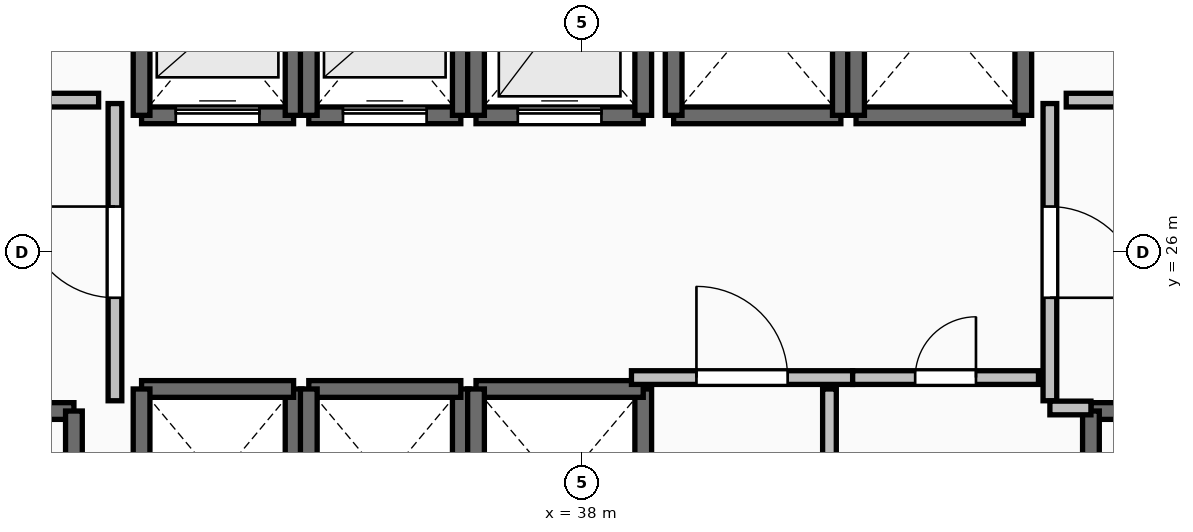
"""IFC4 building model, lengths in metres.
Left out: names, types, materials, properties, quantities, classifications, styles, units other than length and angle.
Written with IfcOpenShell. Run it as: python <this file> out.ifc"""

import sys

from ifc_helpers import new_model, si_unit, direction, frame, frame_2d, origin, place, context, subcontext, project, spatial, rectangle, extrude, element, fill, save


model = new_model("IFC4")
c1 = context("Model", 3, precision=1e-05, world=origin(), true_north=direction((0.0, 1.0)))
c2 = subcontext(c1, "Body", "Model", "MODEL_VIEW")
j1 = project(units=[si_unit("LENGTHUNIT", "METRE"), si_unit("PLANEANGLEUNIT", "RADIAN")], contexts=[c1])
p1 = place(None, origin())
s1 = spatial("IfcSite", under=j1, at=p1, CompositionType="ELEMENT")
p2 = place(p1, origin())
s2 = spatial("IfcBuilding", under=s1, at=p2, CompositionType="ELEMENT")
p3 = place(p2, frame((0.0, 0.0, 117.3)))
s3 = spatial("IfcBuildingStorey", under=s2, at=p3, CompositionType="ELEMENT", Elevation=117.3)
p4 = place(p3, frame((27.94, 23.91, 0.0), z_axis=(0.0, 0.0, 1.0), x_axis=(1.0, 0.0, 0.0)))
e1 = element("IfcWall", 1, at=p4, inside=s3, PredefinedType="SOLIDWALL", context=c2, shape_type="SweptSolid", body=[
    extrude(rectangle(XDim=3.37, YDim=0.22, at=frame_2d((1.685, 0.0))), origin(), (0.0, 0.0, 1.0), 3.24),
])
p5 = place(p4, frame((1.135, 0.0, 0.0)))
e2 = element("IfcOpeningElement", 2, at=p5, cuts=e1, PredefinedType="OPENING", context=c2, shape_type="SweptSolid", body=[
    extrude(rectangle(XDim=1.1, YDim=2.15, at=frame_2d((0.55, 1.075))), frame((0.0, 0.125, 0.0), z_axis=(0.0, -1.0, 0.0), x_axis=(1.0, 0.0, 0.0)), (0.0, 0.0, 1.0), 0.25),
])
p6 = place(p3, frame((31.31, 23.91, 0.0), z_axis=(0.0, 0.0, 1.0), x_axis=(0.0, -1.0, 0.0)))
e3 = element("IfcWall", 3, at=p6, inside=s3, PredefinedType="SOLIDWALL", context=c2, shape_type="SweptSolid", body=[
    extrude(rectangle(XDim=7.42, YDim=0.22, at=frame_2d((3.71, 0.0))), origin(), (0.0, 0.0, 1.0), 3.24),
])
p7 = place(p3, frame((44.69, 23.91, 0.0), z_axis=(0.0, 0.0, 1.0), x_axis=(1.0, 0.0, 0.0)))
e4 = element("IfcWall", 4, at=p7, inside=s3, PredefinedType="SOLIDWALL", context=c2, shape_type="SweptSolid", body=[
    extrude(rectangle(XDim=3.37, YDim=0.22, at=frame_2d((1.685, 0.0))), origin(), (0.0, 0.0, 1.0), 3.24),
])
p8 = place(p7, frame((1.135, 0.0, 0.0)))
e5 = element("IfcOpeningElement", 5, at=p8, cuts=e4, PredefinedType="OPENING", context=c2, shape_type="SweptSolid", body=[
    extrude(rectangle(XDim=1.1, YDim=2.15, at=frame_2d((0.55, 1.075))), frame((0.0, 0.125, 0.0), z_axis=(0.0, -1.0, 0.0), x_axis=(1.0, 0.0, 0.0)), (0.0, 0.0, 1.0), 0.25),
])
p9 = place(p3, frame((44.69, 16.49, 0.0), z_axis=(0.0, 0.0, 1.0), x_axis=(0.0, 1.0, 0.0)))
e6 = element("IfcWall", 6, at=p9, inside=s3, PredefinedType="SOLIDWALL", context=c2, shape_type="SweptSolid", body=[
    extrude(rectangle(XDim=7.42, YDim=0.22, at=frame_2d((3.71, 0.0))), origin(), (0.0, 0.0, 1.0), 3.24),
])
p10 = place(p3, frame((32.2, 27.8, 0.0), z_axis=(0.0, 0.0, 1.0), x_axis=(1.0, 0.0, 0.0)))
e7 = element("IfcWall", 7, at=p10, inside=s3, PredefinedType="SOLIDWALL", context=c2, shape_type="SweptSolid", body=[
    extrude(rectangle(XDim=2.0, YDim=0.22, at=frame_2d((1.0, 0.0))), origin(), (0.0, 0.0, 1.0), 3.24),
])
p11 = place(p10, frame((0.45, 0.0, 0.0)))
e8 = element("IfcOpeningElement", 8, at=p11, cuts=e7, PredefinedType="OPENING", context=c2, shape_type="SweptSolid", body=[
    extrude(rectangle(XDim=1.1, YDim=2.2, at=frame_2d((0.55, 1.1))), frame((0.0, 0.125, 0.0), z_axis=(0.0, -1.0, 0.0), x_axis=(1.0, 0.0, 0.0)), (0.0, 0.0, 1.0), 0.25),
])
for number, where, z_axis, x_axis in (
    (9, (34.2, 27.8, 0.0), (0.0, 0.0, 1.0), (0.0, 1.0, 0.0)),
    (10, (32.2, 30.2, 0.0), (0.0, 0.0, 1.0), (0.0, -1.0, 0.0)),
):
    element("IfcWall", number, at=place(p3, frame(where, z_axis=z_axis, x_axis=x_axis)), inside=s3, PredefinedType="SOLIDWALL", context=c2, shape_type="SweptSolid", body=[
        extrude(rectangle(XDim=2.4, YDim=0.22, at=frame_2d((1.2, 0.0))), origin(), (0.0, 0.0, 1.0), 3.24),
    ])
p12 = place(p3, frame((34.4, 27.8, 0.0), z_axis=(0.0, 0.0, 1.0), x_axis=(1.0, 0.0, 0.0)))
e11 = element("IfcWall", 11, at=p12, inside=s3, PredefinedType="SOLIDWALL", context=c2, shape_type="SweptSolid", body=[
    extrude(rectangle(XDim=2.0, YDim=0.22, at=frame_2d((1.0, 0.0))), origin(), (0.0, 0.0, 1.0), 3.24),
])
p13 = place(p12, frame((0.45, 0.0, 0.0)))
e12 = element("IfcOpeningElement", 12, at=p13, cuts=e11, PredefinedType="OPENING", context=c2, shape_type="SweptSolid", body=[
    extrude(rectangle(XDim=1.1, YDim=2.2, at=frame_2d((0.55, 1.1))), frame((0.0, 0.125, 0.0), z_axis=(0.0, -1.0, 0.0), x_axis=(1.0, 0.0, 0.0)), (0.0, 0.0, 1.0), 0.25),
])
for number, where, z_axis, x_axis in (
    (13, (36.4, 27.8, 0.0), (0.0, 0.0, 1.0), (0.0, 1.0, 0.0)),
    (14, (34.4, 30.2, 0.0), (0.0, 0.0, 1.0), (0.0, -1.0, 0.0)),
):
    element("IfcWall", number, at=place(p3, frame(where, z_axis=z_axis, x_axis=x_axis)), inside=s3, PredefinedType="SOLIDWALL", context=c2, shape_type="SweptSolid", body=[
        extrude(rectangle(XDim=2.4, YDim=0.22, at=frame_2d((1.2, 0.0))), origin(), (0.0, 0.0, 1.0), 3.24),
    ])
p14 = place(p3, frame((36.6, 27.8, 0.0), z_axis=(0.0, 0.0, 1.0), x_axis=(1.0, 0.0, 0.0)))
e15 = element("IfcWall", 15, at=p14, inside=s3, PredefinedType="SOLIDWALL", context=c2, shape_type="SweptSolid", body=[
    extrude(rectangle(XDim=2.2, YDim=0.22, at=frame_2d((1.1, 0.0))), origin(), (0.0, 0.0, 1.0), 3.24),
])
p15 = place(p14, frame((0.55, 0.0, 0.0)))
e16 = element("IfcOpeningElement", 16, at=p15, cuts=e15, PredefinedType="OPENING", context=c2, shape_type="SweptSolid", body=[
    extrude(rectangle(XDim=1.1, YDim=2.2, at=frame_2d((0.55, 1.1))), frame((0.0, 0.125, 0.0), z_axis=(0.0, -1.0, 0.0), x_axis=(1.0, 0.0, 0.0)), (0.0, 0.0, 1.0), 0.25),
])
for number, where, z_axis, x_axis in (
    (17, (38.8, 27.8, 0.0), (0.0, 0.0, 1.0), (0.0, 1.0, 0.0)),
    (18, (36.6, 30.4, 0.0), (0.0, 0.0, 1.0), (0.0, -1.0, 0.0)),
):
    element("IfcWall", number, at=place(p3, frame(where, z_axis=z_axis, x_axis=x_axis)), inside=s3, PredefinedType="SOLIDWALL", context=c2, shape_type="SweptSolid", body=[
        extrude(rectangle(XDim=2.6, YDim=0.22, at=frame_2d((1.3, 0.0))), origin(), (0.0, 0.0, 1.0), 3.24),
    ])
p16 = place(p3, frame((34.2, 21.8, 0.0), z_axis=(0.0, 0.0, 1.0), x_axis=(0.0, 1.0, 0.0)))
e19 = element("IfcWall", 19, at=p16, inside=s3, PredefinedType="SOLIDWALL", context=c2, shape_type="SweptSolid", body=[
    extrude(rectangle(XDim=2.4, YDim=0.22, at=frame_2d((1.2, 0.0))), origin(), (0.0, 0.0, 1.0), 3.24),
])
p17 = place(p3, frame((34.2, 24.2, 0.0), z_axis=(0.0, 0.0, 1.0), x_axis=(-1.0, 0.0, 0.0)))
e20 = element("IfcWall", 20, at=p17, inside=s3, PredefinedType="SOLIDWALL", context=c2, shape_type="SweptSolid", body=[
    extrude(rectangle(XDim=2.0, YDim=0.22, at=frame_2d((1.0, 0.0))), origin(), (0.0, 0.0, 1.0), 3.24),
])
for number, where, z_axis, x_axis in (
    (21, (32.2, 24.2, 0.0), (0.0, 0.0, 1.0), (0.0, -1.0, 0.0)),
    (22, (36.4, 21.8, 0.0), (0.0, 0.0, 1.0), (0.0, 1.0, 0.0)),
):
    element("IfcWall", number, at=place(p3, frame(where, z_axis=z_axis, x_axis=x_axis)), inside=s3, PredefinedType="SOLIDWALL", context=c2, shape_type="SweptSolid", body=[
        extrude(rectangle(XDim=2.4, YDim=0.22, at=frame_2d((1.2, 0.0))), origin(), (0.0, 0.0, 1.0), 3.24),
    ])
p18 = place(p3, frame((36.4, 24.2, 0.0), z_axis=(0.0, 0.0, 1.0), x_axis=(-1.0, 0.0, 0.0)))
e23 = element("IfcWall", 23, at=p18, inside=s3, PredefinedType="SOLIDWALL", context=c2, shape_type="SweptSolid", body=[
    extrude(rectangle(XDim=2.0, YDim=0.22, at=frame_2d((1.0, 0.0))), origin(), (0.0, 0.0, 1.0), 3.24),
])
p19 = place(p3, frame((34.4, 24.2, 0.0), z_axis=(0.0, 0.0, 1.0), x_axis=(0.0, -1.0, 0.0)))
e24 = element("IfcWall", 24, at=p19, inside=s3, PredefinedType="SOLIDWALL", context=c2, shape_type="SweptSolid", body=[
    extrude(rectangle(XDim=2.4, YDim=0.22, at=frame_2d((1.2, 0.0))), origin(), (0.0, 0.0, 1.0), 3.24),
])
p20 = place(p3, frame((38.8, 21.6, 0.0), z_axis=(0.0, 0.0, 1.0), x_axis=(0.0, 1.0, 0.0)))
e25 = element("IfcWall", 25, at=p20, inside=s3, PredefinedType="SOLIDWALL", context=c2, shape_type="SweptSolid", body=[
    extrude(rectangle(XDim=2.6, YDim=0.22, at=frame_2d((1.3, 0.0))), origin(), (0.0, 0.0, 1.0), 3.24),
])
p21 = place(p3, frame((38.8, 24.2, 0.0), z_axis=(0.0, 0.0, 1.0), x_axis=(-1.0, 0.0, 0.0)))
e26 = element("IfcWall", 26, at=p21, inside=s3, PredefinedType="SOLIDWALL", context=c2, shape_type="SweptSolid", body=[
    extrude(rectangle(XDim=2.2, YDim=0.22, at=frame_2d((1.1, 0.0))), origin(), (0.0, 0.0, 1.0), 3.24),
])
p22 = place(p3, frame((36.6, 24.2, 0.0), z_axis=(0.0, 0.0, 1.0), x_axis=(0.0, -1.0, 0.0)))
e27 = element("IfcWall", 27, at=p22, inside=s3, PredefinedType="SOLIDWALL", context=c2, shape_type="SweptSolid", body=[
    extrude(rectangle(XDim=2.6, YDim=0.22, at=frame_2d((1.3, 0.0))), origin(), (0.0, 0.0, 1.0), 3.24),
])
p23 = place(p3, frame((39.2, 27.8, 0.0), z_axis=(0.0, 0.0, 1.0), x_axis=(1.0, 0.0, 0.0)))
e28 = element("IfcWall", 28, at=p23, inside=s3, PredefinedType="SOLIDWALL", context=c2, shape_type="SweptSolid", body=[
    extrude(rectangle(XDim=2.2, YDim=0.22, at=frame_2d((1.1, 0.0))), origin(), (0.0, 0.0, 1.0), 3.24),
])
for number, where, z_axis, x_axis in (
    (29, (41.4, 27.8, 0.0), (0.0, 0.0, 1.0), (0.0, 1.0, 0.0)),
    (30, (39.2, 30.4, 0.0), (0.0, 0.0, 1.0), (0.0, -1.0, 0.0)),
):
    element("IfcWall", number, at=place(p3, frame(where, z_axis=z_axis, x_axis=x_axis)), inside=s3, PredefinedType="SOLIDWALL", context=c2, shape_type="SweptSolid", body=[
        extrude(rectangle(XDim=2.6, YDim=0.22, at=frame_2d((1.3, 0.0))), origin(), (0.0, 0.0, 1.0), 3.24),
    ])
p24 = place(p3, frame((41.6, 27.8, 0.0), z_axis=(0.0, 0.0, 1.0), x_axis=(1.0, 0.0, 0.0)))
e31 = element("IfcWall", 31, at=p24, inside=s3, PredefinedType="SOLIDWALL", context=c2, shape_type="SweptSolid", body=[
    extrude(rectangle(XDim=2.2, YDim=0.22, at=frame_2d((1.1, 0.0))), origin(), (0.0, 0.0, 1.0), 3.24),
])
for number, where, z_axis, x_axis in (
    (32, (43.8, 27.8, 0.0), (0.0, 0.0, 1.0), (0.0, 1.0, 0.0)),
    (33, (41.6, 30.4, 0.0), (0.0, 0.0, 1.0), (0.0, -1.0, 0.0)),
):
    element("IfcWall", number, at=place(p3, frame(where, z_axis=z_axis, x_axis=x_axis)), inside=s3, PredefinedType="SOLIDWALL", context=c2, shape_type="SweptSolid", body=[
        extrude(rectangle(XDim=2.6, YDim=0.22, at=frame_2d((1.3, 0.0))), origin(), (0.0, 0.0, 1.0), 3.24),
    ])
p25 = place(p3, frame((31.85, 24.045, 0.0), z_axis=(0.0, 0.0, 1.0), x_axis=(0.0, 1.0, 0.0)))
e34 = element("IfcWall", 34, at=p25, inside=s3, PredefinedType="PARTITIONING", context=c2, shape_type="SweptSolid", body=[
    extrude(rectangle(XDim=3.91, YDim=0.18, at=frame_2d((1.955, 0.0))), origin(), (0.0, 0.0, 1.0), 3.24),
])
p26 = place(p25, frame((1.355, 0.0, 0.0)))
e35 = element("IfcOpeningElement", 35, at=p26, cuts=e34, PredefinedType="OPENING", context=c2, shape_type="SweptSolid", body=[
    extrude(rectangle(XDim=1.2, YDim=2.15, at=frame_2d((0.6, 1.075))), frame((0.0, 0.105, 0.0), z_axis=(0.0, -1.0, 0.0), x_axis=(1.0, 0.0, 0.0)), (0.0, 0.0, 1.0), 0.21),
])
p27 = place(p3, frame((44.15, 27.955, 0.0), z_axis=(0.0, 0.0, 1.0), x_axis=(0.0, -1.0, 0.0)))
e36 = element("IfcWall", 36, at=p27, inside=s3, PredefinedType="PARTITIONING", context=c2, shape_type="SweptSolid", body=[
    extrude(rectangle(XDim=3.91, YDim=0.18, at=frame_2d((1.955, 0.0))), origin(), (0.0, 0.0, 1.0), 3.24),
])
p28 = place(p27, frame((1.355, 0.0, 0.0)))
e37 = element("IfcOpeningElement", 37, at=p28, cuts=e36, PredefinedType="OPENING", context=c2, shape_type="SweptSolid", body=[
    extrude(rectangle(XDim=1.2, YDim=2.15, at=frame_2d((0.6, 1.075))), frame((0.0, 0.105, 0.0), z_axis=(0.0, -1.0, 0.0), x_axis=(1.0, 0.0, 0.0)), (0.0, 0.0, 1.0), 0.21),
])
p29 = place(p3, frame((44.15, 23.95, 0.0), z_axis=(0.0, 0.0, 1.0), x_axis=(1.0, 0.0, 0.0)))
e38 = element("IfcWall", 38, at=p29, inside=s3, PredefinedType="PARTITIONING", context=c2, shape_type="SweptSolid", body=[
    extrude(rectangle(XDim=0.54, YDim=0.18, at=frame_2d((0.27, 0.0))), origin(), (0.0, 0.0, 1.0), 3.24),
])
p30 = place(p3, frame((38.645, 24.35, 0.0), z_axis=(0.0, 0.0, 1.0), x_axis=(1.0, 0.0, 0.0)))
e39 = element("IfcWall", 39, at=p30, inside=s3, PredefinedType="PARTITIONING", context=c2, shape_type="SweptSolid", body=[
    extrude(rectangle(XDim=2.91, YDim=0.18, at=frame_2d((1.455, 0.0))), origin(), (0.0, 0.0, 1.0), 3.24),
])
p31 = place(p30, frame((0.855, 0.0, 0.0)))
e40 = element("IfcOpeningElement", 40, at=p31, cuts=e39, PredefinedType="OPENING", context=c2, shape_type="SweptSolid", body=[
    extrude(rectangle(XDim=1.2, YDim=2.15, at=frame_2d((0.6, 1.075))), frame((0.0, 0.105, 0.0), z_axis=(0.0, -1.0, 0.0), x_axis=(1.0, 0.0, 0.0)), (0.0, 0.0, 1.0), 0.21),
])
p32 = place(p3, frame((41.555, 24.35, 0.0), z_axis=(0.0, 0.0, 1.0), x_axis=(1.0, 0.0, 0.0)))
e41 = element("IfcWall", 41, at=p32, inside=s3, PredefinedType="PARTITIONING", context=c2, shape_type="SweptSolid", body=[
    extrude(rectangle(XDim=2.445, YDim=0.18, at=frame_2d((1.223, 0.0))), origin(), (0.0, 0.0, 1.0), 3.24),
])
p33 = place(p32, frame((0.823, 0.0, 0.0)))
e42 = element("IfcOpeningElement", 42, at=p33, cuts=e41, PredefinedType="OPENING", context=c2, shape_type="SweptSolid", body=[
    extrude(rectangle(XDim=0.8, YDim=2.05, at=frame_2d((0.4, 1.025))), frame((0.0, 0.105, 0.0), z_axis=(0.0, -1.0, 0.0), x_axis=(1.0, 0.0, 0.0)), (0.0, 0.0, 1.0), 0.21),
])
p34 = place(p3, frame((41.25, 16.32, 0.0), z_axis=(0.0, 0.0, 1.0), x_axis=(0.0, 1.0, 0.0)))
e43 = element("IfcWall", 43, at=p34, inside=s3, PredefinedType="PARTITIONING", context=c2, shape_type="SweptSolid", body=[
    extrude(rectangle(XDim=7.88, YDim=0.18, at=frame_2d((3.94, 0.0))), origin(), (0.0, 0.0, 1.0), 3.24),
])
p35 = place(p34, frame((3.54, 0.0, 0.0)))
e44 = element("IfcOpeningElement", 44, at=p35, cuts=e43, PredefinedType="OPENING", context=c2, shape_type="SweptSolid", body=[
    extrude(rectangle(XDim=0.8, YDim=2.05, at=frame_2d((0.4, 1.025))), frame((0.0, 0.105, 0.0), z_axis=(0.0, -1.0, 0.0), x_axis=(1.0, 0.0, 0.0)), (0.0, 0.0, 1.0), 0.21),
])
for number, where, z_axis, x_axis in (
    (45, (31.635, 28.0, 0.0), (0.0, 0.0, 1.0), (-1.0, 0.0, 0.0)),
    (46, (45.28, 28.0, 0.0), (0.0, 0.0, 1.0), (-1.0, 0.0, 0.0)),
):
    element("IfcWall", number, at=place(p3, frame(where, z_axis=z_axis, x_axis=x_axis)), inside=s3, PredefinedType="PARTITIONING", context=c2, shape_type="SweptSolid", body=[
        extrude(rectangle(XDim=0.915, YDim=0.18, at=frame_2d((0.458, 0.0))), origin(), (0.0, 0.0, 1.0), 3.24),
    ])
p36 = place(p11, origin())
e47 = element("IfcDoor", 47, at=p36, inside=s3, OperationType="SLIDING_TO_LEFT", PredefinedType="DOOR", context=c2, shape_type="SweptSolid", body=[
    extrude(rectangle(XDim=1.1, YDim=2.2, at=frame_2d((0.55, 1.1))), frame((0.0, 0.025, 0.0), z_axis=(0.0, -1.0, 0.0), x_axis=(1.0, 0.0, 0.0)), (0.0, 0.0, 1.0), 0.05),
])
fill(e8, e47)
p37 = place(p13, origin())
e48 = element("IfcDoor", 48, at=p37, inside=s3, OperationType="SLIDING_TO_LEFT", PredefinedType="DOOR", context=c2, shape_type="SweptSolid", body=[
    extrude(rectangle(XDim=1.1, YDim=2.2, at=frame_2d((0.55, 1.1))), frame((0.0, 0.025, 0.0), z_axis=(0.0, -1.0, 0.0), x_axis=(1.0, 0.0, 0.0)), (0.0, 0.0, 1.0), 0.05),
])
fill(e12, e48)
p38 = place(p15, origin())
e49 = element("IfcDoor", 49, at=p38, inside=s3, OperationType="SLIDING_TO_LEFT", PredefinedType="DOOR", context=c2, shape_type="SweptSolid", body=[
    extrude(rectangle(XDim=1.1, YDim=2.2, at=frame_2d((0.55, 1.1))), frame((0.0, 0.025, 0.0), z_axis=(0.0, -1.0, 0.0), x_axis=(1.0, 0.0, 0.0)), (0.0, 0.0, 1.0), 0.05),
])
fill(e16, e49)
p39 = place(p26, origin())
e50 = element("IfcDoor", 50, at=p39, inside=s3, OperationType="SINGLE_SWING_RIGHT", PredefinedType="DOOR", context=c2, shape_type="SweptSolid", body=[
    extrude(rectangle(XDim=1.2, YDim=2.15, at=frame_2d((0.6, 1.075))), frame((0.0, 0.025, 0.0), z_axis=(0.0, -1.0, 0.0), x_axis=(1.0, 0.0, 0.0)), (0.0, 0.0, 1.0), 0.05),
])
fill(e35, e50)
p40 = place(p28, origin())
e51 = element("IfcDoor", 51, at=p40, inside=s3, OperationType="SINGLE_SWING_RIGHT", PredefinedType="DOOR", context=c2, shape_type="SweptSolid", body=[
    extrude(rectangle(XDim=1.2, YDim=2.15, at=frame_2d((0.6, 1.075))), frame((0.0, 0.025, 0.0), z_axis=(0.0, -1.0, 0.0), x_axis=(1.0, 0.0, 0.0)), (0.0, 0.0, 1.0), 0.05),
])
fill(e37, e51)
p41 = place(p31, origin())
e52 = element("IfcDoor", 52, at=p41, inside=s3, OperationType="SINGLE_SWING_LEFT", PredefinedType="DOOR", context=c2, shape_type="SweptSolid", body=[
    extrude(rectangle(XDim=1.2, YDim=2.15, at=frame_2d((0.6, 1.075))), frame((0.0, 0.025, 0.0), z_axis=(0.0, -1.0, 0.0), x_axis=(1.0, 0.0, 0.0)), (0.0, 0.0, 1.0), 0.05),
])
fill(e40, e52)
p42 = place(p33, origin())
e53 = element("IfcDoor", 53, at=p42, inside=s3, OperationType="SINGLE_SWING_RIGHT", PredefinedType="DOOR", context=c2, shape_type="SweptSolid", body=[
    extrude(rectangle(XDim=0.8, YDim=2.05, at=frame_2d((0.4, 1.025))), frame((0.0, 0.025, 0.0), z_axis=(0.0, -1.0, 0.0), x_axis=(1.0, 0.0, 0.0)), (0.0, 0.0, 1.0), 0.05),
])
fill(e42, e53)
save(model, sys.argv[1])
